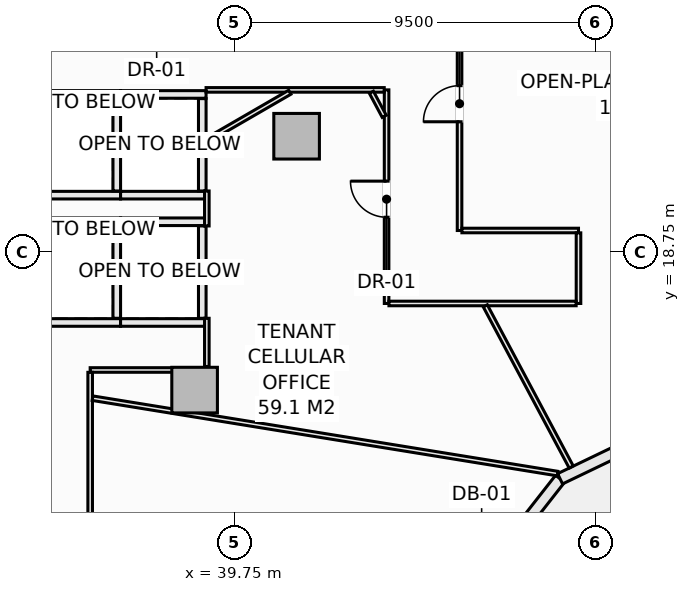
"""IFC4 building model, lengths in metres.
Left out: names, types, materials, properties, quantities, classifications, styles, units other than length and angle.
Written with IfcOpenShell. Run it as: python <this file> out.ifc"""

import sys

from ifc_helpers import new_model, si_unit, direction, frame, frame_2d, origin, origin_2d, place, context, subcontext, project, spatial, rectangle, extrude, element, fill, save


model = new_model("IFC4")
c1 = context("Model", 3, precision=1e-05, world=origin(), true_north=direction((0.0, 1.0)))
c2 = subcontext(c1, "Body", "Model", "MODEL_VIEW")
j1 = project(units=[si_unit("LENGTHUNIT", "METRE"), si_unit("PLANEANGLEUNIT", "RADIAN")], contexts=[c1])
p1 = place(None, origin())
s1 = spatial("IfcSite", under=j1, at=p1, CompositionType="ELEMENT")
p2 = place(p1, origin())
s2 = spatial("IfcBuilding", under=s1, at=p2, CompositionType="ELEMENT")
p3 = place(p2, frame((0.0, 0.0, 26.5)))
s3 = spatial("IfcBuildingStorey", under=s2, at=p3, CompositionType="ELEMENT", Elevation=26.5)
for number, where, z_axis, x_axis in (
    (1, (38.698, 15.121, -0.28), (0.0, 0.0, 1.0), (1.0, 0.0, 0.0)),
    (2, (41.382, 21.801, -0.28), (0.0, 0.0, 1.0), (1.0, 0.0, 0.0)),
):
    element("IfcColumn", number, at=place(p3, frame(where, z_axis=z_axis, x_axis=x_axis)), inside=s3, PredefinedType="COLUMN", context=c2, shape_type="SweptSolid", body=[
        extrude(rectangle(XDim=1.2, YDim=1.2, at=origin_2d()), origin(), (0.0, 0.0, 1.0), 3.85),
    ])
p4 = place(p3, frame((44.188, 7.514, 0.0), z_axis=(0.0, 0.0, 1.0), x_axis=(0.616421309777, 0.787416515482, 0.0)))
e3 = element("IfcWall", 3, at=p4, inside=s3, PredefinedType="SOLIDWALL", context=c2, shape_type="SweptSolid", body=[
    extrude(rectangle(XDim=6.696, YDim=0.3, at=frame_2d((3.348, 0.0))), origin(), (0.0, 0.0, 1.0), 3.093),
])
p5 = place(p4, frame((2.448, 0.0, 0.0)))
e4 = element("IfcOpeningElement", 4, at=p5, cuts=e3, PredefinedType="OPENING", context=c2, shape_type="SweptSolid", body=[
    extrude(rectangle(XDim=1.8, YDim=2.25, at=frame_2d((0.9, 1.125))), frame((0.0, 0.16, 0.0), z_axis=(0.0, -1.0, 0.0), x_axis=(1.0, 0.0, 0.0)), (0.0, 0.0, 1.0), 0.32),
])
p6 = place(p3, frame((48.315, 12.787, 0.0), z_axis=(0.0, 0.0, 1.0), x_axis=(0.901360393999, 0.433069786673, 0.0)))
e5 = element("IfcWall", 5, at=p6, inside=s3, PredefinedType="SOLIDWALL", context=c2, shape_type="SweptSolid", body=[
    extrude(rectangle(XDim=6.842, YDim=0.3, at=frame_2d((3.421, 0.0))), origin(), (0.0, 0.0, 1.0), 3.093),
])
p7 = place(p6, frame((2.221, 0.0, 0.85)))
e6 = element("IfcOpeningElement", 6, at=p7, cuts=e5, PredefinedType="OPENING", context=c2, shape_type="SweptSolid", body=[
    extrude(rectangle(XDim=2.4, YDim=1.9, at=frame_2d((1.2, 0.95))), frame((0.0, 0.16, 0.0), z_axis=(0.0, -1.0, 0.0), x_axis=(1.0, 0.0, 0.0)), (0.0, 0.0, 1.0), 0.32),
])
for number, where, z_axis, x_axis in (
    (7, (34.5, 19.55, 0.0), (0.0, 0.0, 1.0), (1.0, 0.0, 0.0)),
    (8, (34.5, 16.9, 0.0), (0.0, 0.0, 1.0), (1.0, 0.0, 0.0)),
):
    element("IfcWall", number, at=place(p3, frame(where, z_axis=z_axis, x_axis=x_axis)), inside=s3, PredefinedType="SOLIDWALL", context=c2, shape_type="SweptSolid", body=[
        extrude(rectangle(XDim=2.25, YDim=0.2, at=frame_2d((1.125, 0.0))), origin(), (0.0, 0.0, 1.0), 3.57),
    ])
p8 = place(p3, frame((36.65, 17.01, 0.0), z_axis=(0.0, 0.0, 1.0), x_axis=(0.0, 1.0, 0.0)))
e9 = element("IfcWall", 9, at=p8, inside=s3, PredefinedType="SOLIDWALL", context=c2, shape_type="SweptSolid", body=[
    extrude(rectangle(XDim=2.43, YDim=0.2, at=frame_2d((1.215, 0.0))), origin(), (0.0, 0.0, 1.0), 3.57),
])
for number, where, z_axis, x_axis in (
    (10, (36.75, 19.55, 0.0), (0.0, 0.0, 1.0), (1.0, 0.0, 0.0)),
    (11, (36.75, 16.9, 0.0), (0.0, 0.0, 1.0), (1.0, 0.0, 0.0)),
):
    element("IfcWall", number, at=place(p3, frame(where, z_axis=z_axis, x_axis=x_axis)), inside=s3, PredefinedType="SOLIDWALL", context=c2, shape_type="SweptSolid", body=[
        extrude(rectangle(XDim=2.25, YDim=0.2, at=frame_2d((1.125, 0.0))), origin(), (0.0, 0.0, 1.0), 3.57),
    ])
p9 = place(p3, frame((38.9, 17.01, 0.0), z_axis=(0.0, 0.0, 1.0), x_axis=(0.0, 1.0, 0.0)))
e12 = element("IfcWall", 12, at=p9, inside=s3, PredefinedType="SOLIDWALL", context=c2, shape_type="SweptSolid", body=[
    extrude(rectangle(XDim=2.43, YDim=0.2, at=frame_2d((1.215, 0.0))), origin(), (0.0, 0.0, 1.0), 3.57),
])
for number, where, z_axis, x_axis in (
    (13, (34.5, 22.9, 0.0), (0.0, 0.0, 1.0), (1.0, 0.0, 0.0)),
    (14, (34.5, 20.25, 0.0), (0.0, 0.0, 1.0), (1.0, 0.0, 0.0)),
):
    element("IfcWall", number, at=place(p3, frame(where, z_axis=z_axis, x_axis=x_axis)), inside=s3, PredefinedType="SOLIDWALL", context=c2, shape_type="SweptSolid", body=[
        extrude(rectangle(XDim=2.25, YDim=0.2, at=frame_2d((1.125, 0.0))), origin(), (0.0, 0.0, 1.0), 3.57),
    ])
p10 = place(p3, frame((36.65, 20.36, 0.0), z_axis=(0.0, 0.0, 1.0), x_axis=(0.0, 1.0, 0.0)))
e15 = element("IfcWall", 15, at=p10, inside=s3, PredefinedType="SOLIDWALL", context=c2, shape_type="SweptSolid", body=[
    extrude(rectangle(XDim=2.43, YDim=0.2, at=frame_2d((1.215, 0.0))), origin(), (0.0, 0.0, 1.0), 3.57),
])
for number, where, z_axis, x_axis in (
    (16, (36.75, 22.9, 0.0), (0.0, 0.0, 1.0), (1.0, 0.0, 0.0)),
    (17, (36.75, 20.25, 0.0), (0.0, 0.0, 1.0), (1.0, 0.0, 0.0)),
):
    element("IfcWall", number, at=place(p3, frame(where, z_axis=z_axis, x_axis=x_axis)), inside=s3, PredefinedType="SOLIDWALL", context=c2, shape_type="SweptSolid", body=[
        extrude(rectangle(XDim=2.25, YDim=0.2, at=frame_2d((1.125, 0.0))), origin(), (0.0, 0.0, 1.0), 3.57),
    ])
p11 = place(p3, frame((38.9, 20.36, 0.0), z_axis=(0.0, 0.0, 1.0), x_axis=(0.0, 1.0, 0.0)))
e18 = element("IfcWall", 18, at=p11, inside=s3, PredefinedType="SOLIDWALL", context=c2, shape_type="SweptSolid", body=[
    extrude(rectangle(XDim=2.43, YDim=0.2, at=frame_2d((1.215, 0.0))), origin(), (0.0, 0.0, 1.0), 3.57),
])
p12 = place(p3, frame((35.95, 15.65, 0.0), z_axis=(0.0, 0.0, 1.0), x_axis=(1.0, 0.0, 0.0)))
e19 = element("IfcWall", 19, at=p12, inside=s3, PredefinedType="PARTITIONING", context=c2, shape_type="SweptSolid", body=[
    extrude(rectangle(XDim=2.291, YDim=0.12, at=frame_2d((1.146, 0.0))), origin(), (0.0, 0.0, 1.0), 3.57),
])
p13 = place(p3, frame((35.95, 11.75, 0.0), z_axis=(0.0, 0.0, 1.0), x_axis=(0.0, 1.0, 0.0)))
e20 = element("IfcWall", 20, at=p13, inside=s3, PredefinedType="PARTITIONING", context=c2, shape_type="SweptSolid", body=[
    extrude(rectangle(XDim=3.838, YDim=0.12, at=frame_2d((1.919, 0.0))), origin(), (0.0, 0.0, 1.0), 3.57),
])
p14 = place(p3, frame((39.02, 15.742, 0.0), z_axis=(0.0, 0.0, 1.0), x_axis=(0.0, 1.0, 0.0)))
e21 = element("IfcWall", 21, at=p14, inside=s3, PredefinedType="PARTITIONING", context=c2, shape_type="SweptSolid", body=[
    extrude(rectangle(XDim=1.268, YDim=0.12, at=frame_2d((0.634, 0.0))), origin(), (0.0, 0.0, 1.0), 2.934),
])
p15 = place(p3, frame((39.02, 19.44, 0.0), z_axis=(0.0, 0.0, 1.0), x_axis=(0.0, 1.0, 0.0)))
e22 = element("IfcWall", 22, at=p15, inside=s3, PredefinedType="PARTITIONING", context=c2, shape_type="SweptSolid", body=[
    extrude(rectangle(XDim=0.92, YDim=0.12, at=frame_2d((0.46, 0.0))), origin(), (0.0, 0.0, 1.0), 3.57),
])
p16 = place(p3, frame((43.75, 17.4, 0.0), z_axis=(0.0, 0.0, 1.0), x_axis=(0.0, 1.0, 0.0)))
e23 = element("IfcWall", 23, at=p16, inside=s3, PredefinedType="PARTITIONING", context=c2, shape_type="SweptSolid", body=[
    extrude(rectangle(XDim=5.62, YDim=0.12, at=frame_2d((2.81, 0.0))), origin(), (0.0, 0.0, 1.0), 3.57),
])
p17 = place(p16, frame((2.269, 0.0, 0.0)))
e24 = element("IfcOpeningElement", 24, at=p17, cuts=e23, PredefinedType="OPENING", context=c2, shape_type="SweptSolid", body=[
    extrude(rectangle(XDim=0.95, YDim=2.1, at=frame_2d((0.475, 1.05))), frame((0.0, 0.07, 0.0), z_axis=(0.0, -1.0, 0.0), x_axis=(1.0, 0.0, 0.0)), (0.0, 0.0, 1.0), 0.14),
])
p18 = place(p3, frame((45.67, 19.32, 0.0), z_axis=(0.0, 0.0, 1.0), x_axis=(0.0, 1.0, 0.0)))
e25 = element("IfcWall", 25, at=p18, inside=s3, PredefinedType="PARTITIONING", context=c2, shape_type="SweptSolid", body=[
    extrude(rectangle(XDim=8.128, YDim=0.12, at=frame_2d((4.064, 0.0))), origin(), (0.0, 0.0, 1.0), 3.57),
])
p19 = place(p18, frame((2.861, 0.0, 0.0)))
e26 = element("IfcOpeningElement", 26, at=p19, cuts=e25, PredefinedType="OPENING", context=c2, shape_type="SweptSolid", body=[
    extrude(rectangle(XDim=0.95, YDim=2.1, at=frame_2d((0.475, 1.05))), frame((0.0, 0.07, 0.0), z_axis=(0.0, -1.0, 0.0), x_axis=(1.0, 0.0, 0.0)), (0.0, 0.0, 1.0), 0.14),
])
p20 = place(p3, frame((45.732, 19.32, 0.0), z_axis=(0.0, 0.0, 1.0), x_axis=(1.0, 0.0, 0.0)))
e27 = element("IfcWall", 27, at=p20, inside=s3, PredefinedType="PARTITIONING", context=c2, shape_type="SweptSolid", body=[
    extrude(rectangle(XDim=3.068, YDim=0.12, at=frame_2d((1.534, 0.0))), origin(), (0.0, 0.0, 1.0), 3.205),
])
p21 = place(p3, frame((48.8, 17.4, 0.0), z_axis=(0.0, 0.0, 1.0), x_axis=(0.0, 1.0, 0.0)))
e28 = element("IfcWall", 28, at=p21, inside=s3, PredefinedType="PARTITIONING", context=c2, shape_type="SweptSolid", body=[
    extrude(rectangle(XDim=1.858, YDim=0.12, at=frame_2d((0.929, 0.0))), origin(), (0.0, 0.0, 1.0), 3.57),
])
p22 = place(p3, frame((43.812, 17.4, 0.0), z_axis=(0.0, 0.0, 1.0), x_axis=(1.0, 0.0, 0.0)))
e29 = element("IfcWall", 29, at=p22, inside=s3, PredefinedType="PARTITIONING", context=c2, shape_type="SweptSolid", body=[
    extrude(rectangle(XDim=4.926, YDim=0.12, at=frame_2d((2.463, 0.0))), origin(), (0.0, 0.0, 1.0), 3.57),
])
p23 = place(p3, frame((39.0, 23.02, 0.0), z_axis=(0.0, 0.0, 1.0), x_axis=(1.0, 0.0, 0.0)))
e30 = element("IfcWall", 30, at=p23, inside=s3, PredefinedType="PARTITIONING", context=c2, shape_type="SweptSolid", body=[
    extrude(rectangle(XDim=4.688, YDim=0.12, at=frame_2d((2.344, 0.0))), origin(), (0.0, 0.0, 1.0), 3.57),
])
p24 = place(p3, frame((39.02, 21.694, 0.0), z_axis=(0.0, 0.0, 1.0), x_axis=(0.865382109932, 0.501112566006, 0.0)))
e31 = element("IfcWall", 31, at=p24, inside=s3, PredefinedType="PARTITIONING", context=c2, shape_type="SweptSolid", body=[
    extrude(rectangle(XDim=2.523, YDim=0.12, at=frame_2d((1.261, 0.0))), origin(), (0.0, 0.0, 1.0), 3.57),
])
p25 = place(p3, frame((36.012, 14.908, 0.0), z_axis=(0.0, 0.0, 1.0), x_axis=(0.987115987943, -0.16000633221, 0.0)))
e32 = element("IfcWall", 32, at=p25, inside=s3, PredefinedType="PARTITIONING", context=c2, shape_type="SweptSolid", body=[
    extrude(rectangle(XDim=12.397, YDim=0.12, at=frame_2d((6.199, 0.0))), origin(), (0.0, 0.0, 1.0), 2.934),
])
p26 = place(p3, frame((43.35, 22.958, 0.0), z_axis=(0.0, 0.0, 1.0), x_axis=(0.470447086679, -0.882428205938, 0.0)))
e33 = element("IfcWall", 33, at=p26, inside=s3, PredefinedType="PARTITIONING", context=c2, shape_type="SweptSolid", body=[
    extrude(rectangle(XDim=0.718, YDim=0.12, at=frame_2d((0.359, 0.0))), origin(), (0.0, 0.0, 1.0), 3.57),
])
p27 = place(p3, frame((46.347, 17.338, 0.0), z_axis=(0.0, 0.0, 1.0), x_axis=(0.470506505613, -0.882396525478, 0.0)))
e34 = element("IfcWall", 34, at=p27, inside=s3, PredefinedType="PARTITIONING", context=c2, shape_type="SweptSolid", body=[
    extrude(rectangle(XDim=4.806, YDim=0.12, at=frame_2d((2.403, 0.0))), origin(), (0.0, 0.0, 1.0), 3.57),
])
p28 = place(p17, origin())
e35 = element("IfcDoor", 35, at=p28, inside=s3, OperationType="SINGLE_SWING_RIGHT", PredefinedType="DOOR", context=c2, shape_type="SweptSolid", body=[
    extrude(rectangle(XDim=0.95, YDim=2.1, at=frame_2d((0.475, 1.05))), frame((0.0, 0.025, 0.0), z_axis=(0.0, -1.0, 0.0), x_axis=(1.0, 0.0, 0.0)), (0.0, 0.0, 1.0), 0.05),
])
fill(e24, e35)
p29 = place(p19, origin())
e36 = element("IfcDoor", 36, at=p29, inside=s3, OperationType="SINGLE_SWING_LEFT", PredefinedType="DOOR", context=c2, shape_type="SweptSolid", body=[
    extrude(rectangle(XDim=0.95, YDim=2.1, at=frame_2d((0.475, 1.05))), frame((0.0, 0.025, 0.0), z_axis=(0.0, -1.0, 0.0), x_axis=(1.0, 0.0, 0.0)), (0.0, 0.0, 1.0), 0.05),
])
fill(e26, e36)
save(model, sys.argv[1])
